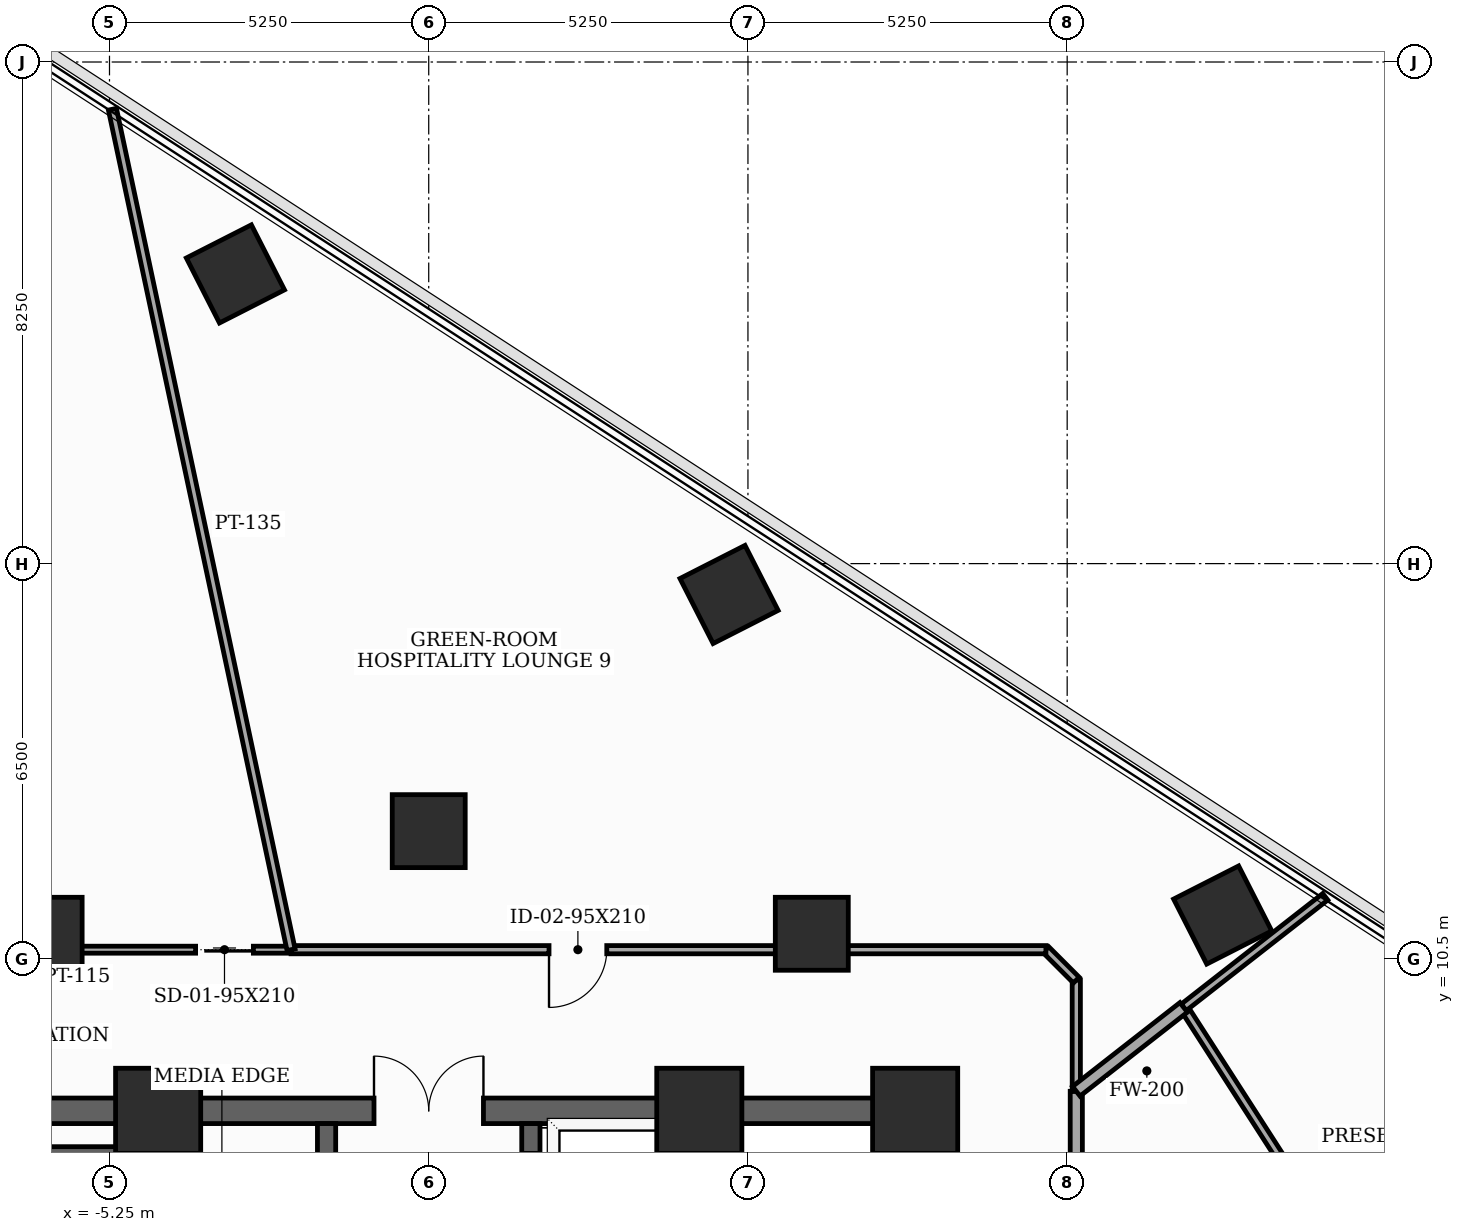
"""IFC4 building model, lengths in metres.
Left out: names, types, materials, properties, quantities, classifications, styles, units other than length and angle.
Written with IfcOpenShell. Run it as: python <this file> out.ifc"""

import sys

from ifc_helpers import new_model, si_unit, direction, frame, frame_2d, origin, origin_2d, place, context, subcontext, project, spatial, rectangle, extrude, element, fill, save


model = new_model("IFC4")
c1 = context("Model", 3, precision=1e-05, world=origin(), true_north=direction((0.0, 1.0)))
c2 = subcontext(c1, "Body", "Model", "MODEL_VIEW")
j1 = project(units=[si_unit("LENGTHUNIT", "METRE"), si_unit("PLANEANGLEUNIT", "RADIAN")], contexts=[c1])
p1 = place(None, origin())
s1 = spatial("IfcSite", under=j1, at=p1, CompositionType="ELEMENT")
p2 = place(p1, origin())
s2 = spatial("IfcBuilding", under=s1, at=p2, CompositionType="ELEMENT")
p3 = place(p2, frame((0.0, 0.0, 127.3)))
s3 = spatial("IfcBuildingStorey", under=s2, at=p3, CompositionType="ELEMENT", Elevation=127.3)
for number, where, z_axis, x_axis in (
    (1, (8.0, 8.0, 0.0), (0.0, 0.0, 1.0), (1.0, 0.0, 0.0)),
    (2, (4.45, 8.0, 0.0), (0.0, 0.0, 1.0), (1.0, 0.0, 0.0)),
    (3, (-4.45, 8.0, 0.0), (0.0, 0.0, 1.0), (1.0, 0.0, 0.0)),
):
    element("IfcColumn", number, at=place(p3, frame(where, z_axis=z_axis, x_axis=x_axis)), inside=s3, PredefinedType="COLUMN", context=c2, shape_type="SweptSolid", body=[
        extrude(rectangle(XDim=1.4, YDim=1.4, at=origin_2d()), origin(), (0.0, 0.0, 1.0), 3.7),
    ])
for number, where, z_axis, x_axis in (
    (4, (6.3, 10.912, 0.0), (0.0, 0.0, 1.0), (1.0, 0.0, 0.0)),
    (5, (0.0, 12.6, 0.0), (0.0, 0.0, 1.0), (1.0, 0.0, 0.0)),
    (6, (-6.3, 10.912, 0.0), (0.0, 0.0, 1.0), (1.0, 0.0, 0.0)),
    (7, (13.058, 11.22, 0.0), (0.0, 0.0, 1.0), (0.891, 0.454, 0.0)),
    (8, (4.939, 16.492, 0.0), (0.0, 0.0, 1.0), (0.891, 0.454, 0.0)),
    (9, (-3.179, 21.765, 0.0), (0.0, 0.0, 1.0), (0.891, 0.454, 0.0)),
):
    element("IfcColumn", number, at=place(p3, frame(where, z_axis=z_axis, x_axis=x_axis)), inside=s3, PredefinedType="COLUMN", context=c2, shape_type="SweptSolid", body=[
        extrude(rectangle(XDim=1.2, YDim=1.2, at=origin_2d()), origin(), (0.0, 0.0, 1.0), 3.7),
    ])
p4 = place(p3, frame((8.0, -8.0, 0.0), z_axis=(0.0, 0.0, 1.0), x_axis=(0.0, 1.0, 0.0)))
e10 = element("IfcWall", 10, at=p4, inside=s3, PredefinedType="SHEAR", context=c2, shape_type="SweptSolid", body=[
    extrude(rectangle(XDim=16.0, YDim=0.42, at=frame_2d((8.0, 0.0))), origin(), (0.0, 0.0, 1.0), 3.5),
])
p5 = place(p4, frame((9.6, 0.0, 0.0)))
e11 = element("IfcOpeningElement", 11, at=p5, cuts=e10, PredefinedType="OPENING", context=c2, shape_type="SweptSolid", body=[
    extrude(rectangle(XDim=1.05, YDim=2.15, at=frame_2d((0.525, 1.075))), frame((0.0, 0.22, 0.0), z_axis=(0.0, -1.0, 0.0), x_axis=(1.0, 0.0, 0.0)), (0.0, 0.0, 1.0), 0.44),
])
p6 = place(p4, frame((14.229, 0.0, 0.0)))
e12 = element("IfcOpeningElement", 12, at=p6, cuts=e10, PredefinedType="OPENING", context=c2, shape_type="SweptSolid", body=[
    extrude(rectangle(XDim=0.85, YDim=2.02, at=frame_2d((0.425, 1.01))), frame((0.0, 0.22, 0.0), z_axis=(0.0, -1.0, 0.0), x_axis=(1.0, 0.0, 0.0)), (0.0, 0.0, 1.0), 0.44),
])
p7 = place(p3, frame((-8.0, 8.0, 0.0), z_axis=(0.0, 0.0, 1.0), x_axis=(1.0, 0.0, 0.0)))
e13 = element("IfcWall", 13, at=p7, inside=s3, PredefinedType="SHEAR", context=c2, shape_type="SweptSolid", body=[
    extrude(rectangle(XDim=16.0, YDim=0.42, at=frame_2d((8.0, 0.0))), origin(), (0.0, 0.0, 1.0), 3.5),
])
p8 = place(p7, frame((7.1, 0.0, 0.0)))
e14 = element("IfcOpeningElement", 14, at=p8, cuts=e13, PredefinedType="OPENING", context=c2, shape_type="SweptSolid", body=[
    extrude(rectangle(XDim=1.8, YDim=2.15, at=frame_2d((0.9, 1.075))), frame((0.0, 0.22, 0.0), z_axis=(0.0, -1.0, 0.0), x_axis=(1.0, 0.0, 0.0)), (0.0, 0.0, 1.0), 0.44),
])
for number, where, z_axis, x_axis in (
    (15, (-4.45, -7.79, 0.0), (0.0, 0.0, 1.0), (0.0, 1.0, 0.0)),
    (16, (4.45, -7.79, 0.0), (0.0, 0.0, 1.0), (0.0, 1.0, 0.0)),
):
    element("IfcWall", number, at=place(p3, frame(where, z_axis=z_axis, x_axis=x_axis)), inside=s3, PredefinedType="SHEAR", context=c2, shape_type="SweptSolid", body=[
        extrude(rectangle(XDim=15.58, YDim=0.3, at=frame_2d((7.79, 0.0))), origin(), (0.0, 0.0, 1.0), 3.5),
    ])
p9 = place(p3, frame((-7.79, 7.26, 0.0), z_axis=(0.0, 0.0, 1.0), x_axis=(1.0, 0.0, 0.0)))
e17 = element("IfcWall", 17, at=p9, inside=s3, PredefinedType="SHEAR", context=c2, shape_type="SweptSolid", body=[
    extrude(rectangle(XDim=3.34, YDim=0.3, at=frame_2d((1.67, 0.0))), origin(), (0.0, 0.0, 1.0), 3.5),
])
p10 = place(p3, frame((-1.68, -4.85, 0.0), z_axis=(0.0, 0.0, 1.0), x_axis=(0.0, 1.0, 0.0)))
e18 = element("IfcWall", 18, at=p10, inside=s3, PredefinedType="SHEAR", context=c2, shape_type="SweptSolid", body=[
    extrude(rectangle(XDim=12.64, YDim=0.3, at=frame_2d((6.32, 0.0))), origin(), (0.0, 0.0, 1.0), 3.5),
])
p11 = place(p10, frame((1.65, 0.0, 0.0)))
e19 = element("IfcOpeningElement", 19, at=p11, cuts=e18, PredefinedType="OPENING", context=c2, shape_type="SweptSolid", body=[
    extrude(rectangle(XDim=0.95, YDim=2.1, at=frame_2d((0.475, 1.05))), frame((0.0, 0.16, 0.0), z_axis=(0.0, -1.0, 0.0), x_axis=(1.0, 0.0, 0.0)), (0.0, 0.0, 1.0), 0.32),
])
p12 = place(p10, frame((5.9, 0.0, 0.0)))
e20 = element("IfcOpeningElement", 20, at=p12, cuts=e18, PredefinedType="OPENING", context=c2, shape_type="SweptSolid", body=[
    extrude(rectangle(XDim=0.95, YDim=2.1, at=frame_2d((0.475, 1.05))), frame((0.0, 0.16, 0.0), z_axis=(0.0, -1.0, 0.0), x_axis=(1.0, 0.0, 0.0)), (0.0, 0.0, 1.0), 0.32),
])
p13 = place(p10, frame((10.1, 0.0, 0.0)))
e21 = element("IfcOpeningElement", 21, at=p13, cuts=e18, PredefinedType="OPENING", context=c2, shape_type="SweptSolid", body=[
    extrude(rectangle(XDim=0.95, YDim=2.1, at=frame_2d((0.475, 1.05))), frame((0.0, 0.16, 0.0), z_axis=(0.0, -1.0, 0.0), x_axis=(1.0, 0.0, 0.0)), (0.0, 0.0, 1.0), 0.32),
])
p14 = place(p3, frame((1.68, -4.85, 0.0), z_axis=(0.0, 0.0, 1.0), x_axis=(0.0, 1.0, 0.0)))
e22 = element("IfcWall", 22, at=p14, inside=s3, PredefinedType="SHEAR", context=c2, shape_type="SweptSolid", body=[
    extrude(rectangle(XDim=12.64, YDim=0.3, at=frame_2d((6.32, 0.0))), origin(), (0.0, 0.0, 1.0), 3.5),
])
p15 = place(p14, frame((0.55, 0.0, 0.0)))
e23 = element("IfcOpeningElement", 23, at=p15, cuts=e22, PredefinedType="OPENING", context=c2, shape_type="SweptSolid", body=[
    extrude(rectangle(XDim=1.1, YDim=2.1, at=frame_2d((0.55, 1.05))), frame((0.0, 0.16, 0.0), z_axis=(0.0, -1.0, 0.0), x_axis=(1.0, 0.0, 0.0)), (0.0, 0.0, 1.0), 0.32),
])
p16 = place(p14, frame((2.65, 0.0, 0.0)))
e24 = element("IfcOpeningElement", 24, at=p16, cuts=e22, PredefinedType="OPENING", context=c2, shape_type="SweptSolid", body=[
    extrude(rectangle(XDim=1.1, YDim=2.1, at=frame_2d((0.55, 1.05))), frame((0.0, 0.16, 0.0), z_axis=(0.0, -1.0, 0.0), x_axis=(1.0, 0.0, 0.0)), (0.0, 0.0, 1.0), 0.32),
])
p17 = place(p14, frame((4.75, 0.0, 0.0)))
e25 = element("IfcOpeningElement", 25, at=p17, cuts=e22, PredefinedType="OPENING", context=c2, shape_type="SweptSolid", body=[
    extrude(rectangle(XDim=1.1, YDim=2.1, at=frame_2d((0.55, 1.05))), frame((0.0, 0.16, 0.0), z_axis=(0.0, -1.0, 0.0), x_axis=(1.0, 0.0, 0.0)), (0.0, 0.0, 1.0), 0.32),
])
p18 = place(p14, frame((6.85, 0.0, 0.0)))
e26 = element("IfcOpeningElement", 26, at=p18, cuts=e22, PredefinedType="OPENING", context=c2, shape_type="SweptSolid", body=[
    extrude(rectangle(XDim=1.1, YDim=2.1, at=frame_2d((0.55, 1.05))), frame((0.0, 0.16, 0.0), z_axis=(0.0, -1.0, 0.0), x_axis=(1.0, 0.0, 0.0)), (0.0, 0.0, 1.0), 0.32),
])
p19 = place(p14, frame((8.95, 0.0, 0.0)))
e27 = element("IfcOpeningElement", 27, at=p19, cuts=e22, PredefinedType="OPENING", context=c2, shape_type="SweptSolid", body=[
    extrude(rectangle(XDim=1.1, YDim=2.1, at=frame_2d((0.55, 1.05))), frame((0.0, 0.16, 0.0), z_axis=(0.0, -1.0, 0.0), x_axis=(1.0, 0.0, 0.0)), (0.0, 0.0, 1.0), 0.32),
])
p20 = place(p14, frame((11.05, 0.0, 0.0)))
e28 = element("IfcOpeningElement", 28, at=p20, cuts=e22, PredefinedType="OPENING", context=c2, shape_type="SweptSolid", body=[
    extrude(rectangle(XDim=1.1, YDim=2.1, at=frame_2d((0.55, 1.05))), frame((0.0, 0.16, 0.0), z_axis=(0.0, -1.0, 0.0), x_axis=(1.0, 0.0, 0.0)), (0.0, 0.0, 1.0), 0.32),
])
p21 = place(p3, frame((10.65, 2.655, 0.0), z_axis=(0.0, 0.0, 1.0), x_axis=(0.0, 1.0, 0.0)))
e29 = element("IfcWall", 29, at=p21, inside=s3, PredefinedType="SOLIDWALL", context=c2, shape_type="SweptSolid", body=[
    extrude(rectangle(XDim=5.666, YDim=0.2, at=frame_2d((2.833, 0.0))), origin(), (0.0, 0.0, 1.0), 2.785),
])
p22 = place(p21, frame((0.673, 0.0, 0.0)))
e30 = element("IfcOpeningElement", 30, at=p22, cuts=e29, PredefinedType="OPENING", context=c2, shape_type="SweptSolid", body=[
    extrude(rectangle(XDim=0.92, YDim=2.1, at=frame_2d((0.46, 1.05))), frame((0.0, 0.11, 0.0), z_axis=(0.0, -1.0, 0.0), x_axis=(1.0, 0.0, 0.0)), (0.0, 0.0, 1.0), 0.22),
])
p23 = place(p3, frame((10.65, 8.321, 0.0), z_axis=(0.0, 0.0, 1.0), x_axis=(0.0, 1.0, 0.0)))
e31 = element("IfcWall", 31, at=p23, inside=s3, PredefinedType="PARTITIONING", context=c2, shape_type="SweptSolid", body=[
    extrude(rectangle(XDim=1.829, YDim=0.135, at=frame_2d((0.915, 0.0))), origin(), (0.0, 0.0, 1.0), 3.125),
])
p24 = place(p3, frame((10.65, 10.15, 0.0), z_axis=(0.0, 0.0, 1.0), x_axis=(-0.707106781187, 0.707106781187, 0.0)))
e32 = element("IfcWall", 32, at=p24, inside=s3, PredefinedType="PARTITIONING", context=c2, shape_type="SweptSolid", body=[
    extrude(rectangle(XDim=0.707, YDim=0.135, at=frame_2d((0.354, 0.0))), origin(), (0.0, 0.0, 1.0), 3.125),
])
p25 = place(p3, frame((10.15, 10.65, 0.0), z_axis=(0.0, 0.0, 1.0), x_axis=(-1.0, 0.0, 0.0)))
e33 = element("IfcWall", 33, at=p25, inside=s3, PredefinedType="PARTITIONING", context=c2, shape_type="SweptSolid", body=[
    extrude(rectangle(XDim=12.414, YDim=0.135, at=frame_2d((6.207, 0.0))), origin(), (0.0, 0.0, 1.0), 2.785),
])
p26 = place(p25, frame((7.222, 0.0, 0.0)))
e34 = element("IfcOpeningElement", 34, at=p26, cuts=e33, PredefinedType="OPENING", context=c2, shape_type="SweptSolid", body=[
    extrude(rectangle(XDim=0.95, YDim=2.1, at=frame_2d((0.475, 1.05))), frame((0.0, 0.077, 0.0), z_axis=(0.0, -1.0, 0.0), x_axis=(1.0, 0.0, 0.0)), (0.0, 0.0, 1.0), 0.155),
])
p27 = place(p3, frame((-2.264, 10.65, 0.0), z_axis=(0.0, 0.0, 1.0), x_axis=(-1.0, 0.0, 0.0)))
e35 = element("IfcWall", 35, at=p27, inside=s3, PredefinedType="PARTITIONING", context=c2, shape_type="SweptSolid", body=[
    extrude(rectangle(XDim=5.474, YDim=0.115, at=frame_2d((2.737, 0.0))), origin(), (0.0, 0.0, 1.0), 2.785),
])
p28 = place(p27, frame((0.62, 0.0, 0.0)))
e36 = element("IfcOpeningElement", 36, at=p28, cuts=e35, PredefinedType="OPENING", context=c2, shape_type="SweptSolid", body=[
    extrude(rectangle(XDim=0.95, YDim=2.1, at=frame_2d((0.475, 1.05))), frame((0.0, 0.067, 0.0), z_axis=(0.0, -1.0, 0.0), x_axis=(1.0, 0.0, 0.0)), (0.0, 0.0, 1.0), 0.135),
])
p29 = place(p3, frame((12.416, 9.701, 0.0), z_axis=(0.0, 0.0, 1.0), x_axis=(0.540981963117, -0.841034194062, 0.0)))
e37 = element("IfcWall", 37, at=p29, inside=s3, PredefinedType="PARTITIONING", context=c2, shape_type="SweptSolid", body=[
    extrude(rectangle(XDim=3.299, YDim=0.135, at=frame_2d((1.65, 0.0))), origin(), (0.0, 0.0, 1.0), 2.885),
])
p30 = place(p3, frame((14.744, 11.52, 0.0), z_axis=(0.0, 0.0, 1.0), x_axis=(-0.788015604839, -0.615655265981, 0.0)))
e38 = element("IfcWall", 38, at=p30, inside=s3, PredefinedType="PARTITIONING", context=c2, shape_type="SweptSolid", body=[
    extrude(rectangle(XDim=2.955, YDim=0.135, at=frame_2d((1.478, 0.0))), origin(), (0.0, 0.0, 1.0), 2.885),
])
p31 = place(p3, frame((12.416, 9.701, 0.0), z_axis=(0.0, 0.0, 1.0), x_axis=(-0.788001252745, -0.615673635681, 0.0)))
e39 = element("IfcWall", 39, at=p31, inside=s3, PredefinedType="SOLIDWALL", context=c2, shape_type="SweptSolid", body=[
    extrude(rectangle(XDim=2.241, YDim=0.2, at=frame_2d((1.121, 0.0))), origin(), (0.0, 0.0, 1.0), 2.885),
])
p32 = place(p3, frame((-5.202, 24.473, 0.0), z_axis=(0.0, 0.0, 1.0), x_axis=(0.207879417489, -0.978154460085, 0.0)))
e40 = element("IfcWall", 40, at=p32, inside=s3, PredefinedType="PARTITIONING", context=c2, shape_type="SweptSolid", body=[
    extrude(rectangle(XDim=14.132, YDim=0.135, at=frame_2d((7.066, 0.0))), origin(), (0.0, 0.0, 1.0), 2.785),
])
p33 = place(p8, origin())
e41 = element("IfcDoor", 41, at=p33, inside=s3, OperationType="DOUBLE_DOOR_SINGLE_SWING", PredefinedType="DOOR", context=c2, shape_type="SweptSolid", body=[
    extrude(rectangle(XDim=1.8, YDim=2.15, at=frame_2d((0.9, 1.075))), frame((0.0, 0.025, 0.0), z_axis=(0.0, -1.0, 0.0), x_axis=(1.0, 0.0, 0.0)), (0.0, 0.0, 1.0), 0.05),
])
fill(e14, e41)
p34 = place(p26, origin())
e42 = element("IfcDoor", 42, at=p34, inside=s3, OperationType="SINGLE_SWING_RIGHT", PredefinedType="DOOR", context=c2, shape_type="SweptSolid", body=[
    extrude(rectangle(XDim=0.95, YDim=2.1, at=frame_2d((0.475, 1.05))), frame((0.0, 0.025, 0.0), z_axis=(0.0, -1.0, 0.0), x_axis=(1.0, 0.0, 0.0)), (0.0, 0.0, 1.0), 0.05),
])
fill(e34, e42)
p35 = place(p28, origin())
e43 = element("IfcDoor", 43, at=p35, inside=s3, OperationType="SLIDING_TO_LEFT", PredefinedType="DOOR", context=c2, shape_type="SweptSolid", body=[
    extrude(rectangle(XDim=0.95, YDim=2.1, at=frame_2d((0.475, 1.05))), frame((0.0, 0.025, 0.0), z_axis=(0.0, -1.0, 0.0), x_axis=(1.0, 0.0, 0.0)), (0.0, 0.0, 1.0), 0.05),
])
fill(e36, e43)
save(model, sys.argv[1])
